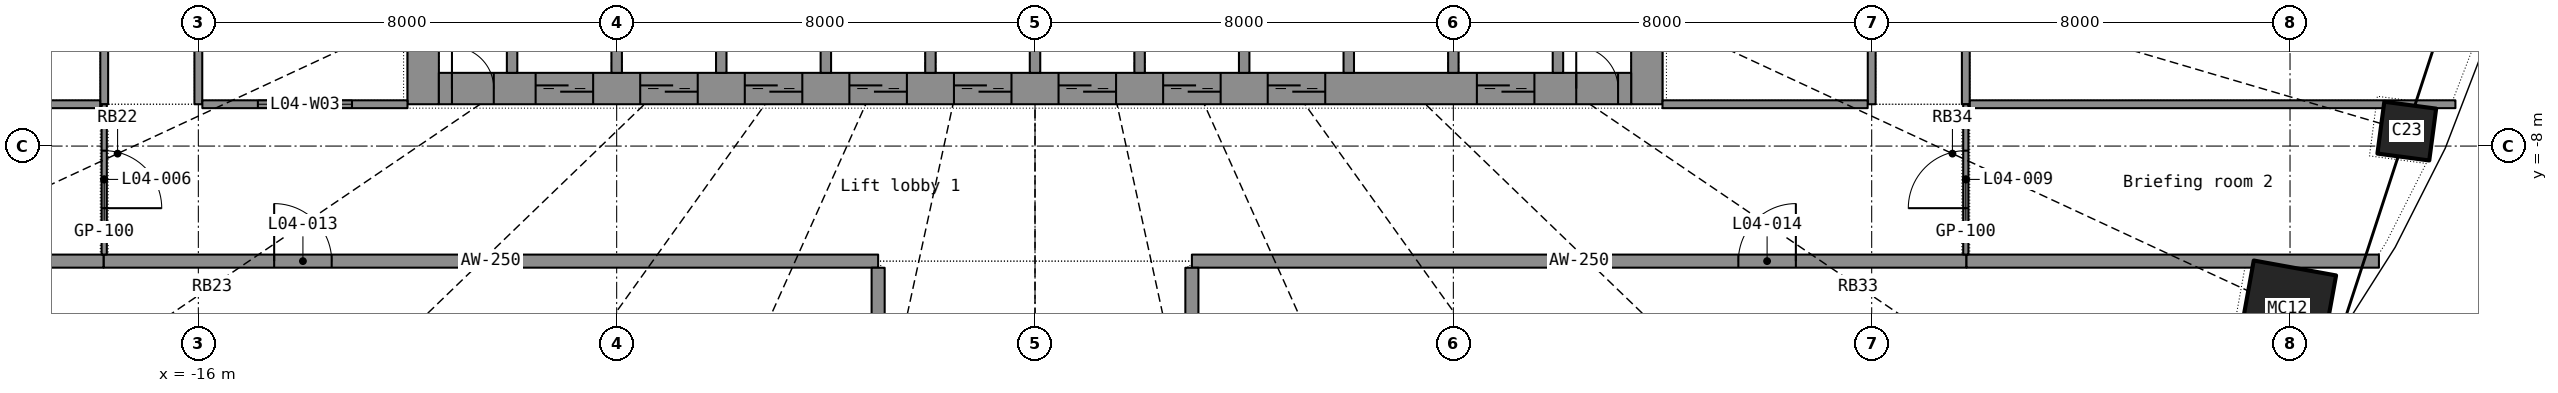
"""IFC4 building model, lengths in metres.
Left out: names, types, materials, properties, quantities, classifications, styles, units other than length and angle.
Written with IfcOpenShell. Run it as: python <this file> out.ifc"""

import sys

from ifc_helpers import new_model, si_unit, direction, frame, frame_2d, origin, origin_2d, place, context, subcontext, project, spatial, rectangle, hollow_rectangle, extrude, element, fill, save


model = new_model("IFC4")
c1 = context("Model", 3, precision=1e-05, world=origin(), true_north=direction((0.0, 1.0)))
c2 = subcontext(c1, "Body", "Model", "MODEL_VIEW")
j1 = project(units=[si_unit("LENGTHUNIT", "METRE"), si_unit("PLANEANGLEUNIT", "RADIAN")], contexts=[c1])
p1 = place(None, origin())
s1 = spatial("IfcSite", under=j1, at=p1, CompositionType="ELEMENT")
p2 = place(p1, origin())
s2 = spatial("IfcBuilding", under=s1, at=p2, CompositionType="ELEMENT")
p3 = place(p2, frame((0.0, 0.0, 24.5)))
s3 = spatial("IfcBuildingStorey", under=s2, at=p3, CompositionType="ELEMENT", Elevation=24.5)
p4 = place(p3, frame((23.951, -11.118, 0.0), z_axis=(-0.029978272, 0.014175772, 0.999450024), x_axis=(-0.581821077, -0.813295293, -0.005916156)))
e1 = element("IfcColumn", 1, at=p4, inside=s3, PredefinedType="COLUMN", context=c2, shape_type="SweptSolid", body=[
    extrude(hollow_rectangle(XDim=1.6, YDim=1.6, WallThickness=0.04, at=origin_2d()), origin(), (0.0, 0.0, 1.0), 4.202),
])
p5 = place(p3, frame((26.233, -7.714, 0.0), z_axis=(-0.032533697, 0.009702013, 0.999423549), x_axis=(-0.40948935, -0.912303929, -0.004473596)))
e2 = element("IfcColumn", 2, at=p5, inside=s3, PredefinedType="COLUMN", context=c2, shape_type="SweptSolid", body=[
    extrude(hollow_rectangle(XDim=1.0, YDim=1.0, WallThickness=0.032, at=origin_2d()), origin(), (0.0, 0.0, 1.0), 4.202),
])
p6 = place(p3, frame((-11.7, -7.2, 0.0), z_axis=(0.0, 0.0, 1.0), x_axis=(0.0, 1.0, 0.0)))
e3 = element("IfcWall", 3, at=p6, inside=s3, PredefinedType="SHEAR", context=c2, shape_type="SweptSolid", body=[
    extrude(rectangle(XDim=14.4, YDim=0.6, at=frame_2d((7.2, 0.0))), origin(), (0.0, 0.0, 1.0), 3.8),
])
p7 = place(p6, frame((6.5, 0.0, 0.0)))
e4 = element("IfcOpeningElement", 4, at=p7, cuts=e3, PredefinedType="OPENING", context=c2, shape_type="SweptSolid", body=[
    extrude(rectangle(XDim=1.4, YDim=2.2, at=frame_2d((0.7, 1.1))), frame((0.0, 0.31, 0.0), z_axis=(0.0, -1.0, 0.0), x_axis=(1.0, 0.0, 0.0)), (0.0, 0.0, 1.0), 0.62),
])
p8 = place(p3, frame((11.7, -7.2, 0.0), z_axis=(0.0, 0.0, 1.0), x_axis=(0.0, 1.0, 0.0)))
e5 = element("IfcWall", 5, at=p8, inside=s3, PredefinedType="SHEAR", context=c2, shape_type="SweptSolid", body=[
    extrude(rectangle(XDim=14.4, YDim=0.6, at=frame_2d((7.2, 0.0))), origin(), (0.0, 0.0, 1.0), 3.8),
])
p9 = place(p8, frame((6.5, 0.0, 0.0)))
e6 = element("IfcOpeningElement", 6, at=p9, cuts=e5, PredefinedType="OPENING", context=c2, shape_type="SweptSolid", body=[
    extrude(rectangle(XDim=1.4, YDim=2.2, at=frame_2d((0.7, 1.1))), frame((0.0, 0.31, 0.0), z_axis=(0.0, -1.0, 0.0), x_axis=(1.0, 0.0, 0.0)), (0.0, 0.0, 1.0), 0.62),
])
p10 = place(p3, frame((-11.4, -6.9, 0.0), z_axis=(0.0, 0.0, 1.0), x_axis=(1.0, 0.0, 0.0)))
e7 = element("IfcWall", 7, at=p10, inside=s3, PredefinedType="SHEAR", context=c2, shape_type="SweptSolid", body=[
    extrude(rectangle(XDim=22.8, YDim=0.6, at=frame_2d((11.4, 0.0))), origin(), (0.0, 0.0, 1.0), 3.8),
])
p11 = place(p10, frame((1.85, 0.0, 0.0)))
e8 = element("IfcOpeningElement", 8, at=p11, cuts=e7, PredefinedType="OPENING", context=c2, shape_type="SweptSolid", body=[
    extrude(rectangle(XDim=1.1, YDim=2.2, at=frame_2d((0.55, 1.1))), frame((0.0, 0.31, 0.0), z_axis=(0.0, -1.0, 0.0), x_axis=(1.0, 0.0, 0.0)), (0.0, 0.0, 1.0), 0.62),
])
p12 = place(p10, frame((3.85, 0.0, 0.0)))
e9 = element("IfcOpeningElement", 9, at=p12, cuts=e7, PredefinedType="OPENING", context=c2, shape_type="SweptSolid", body=[
    extrude(rectangle(XDim=1.1, YDim=2.2, at=frame_2d((0.55, 1.1))), frame((0.0, 0.31, 0.0), z_axis=(0.0, -1.0, 0.0), x_axis=(1.0, 0.0, 0.0)), (0.0, 0.0, 1.0), 0.62),
])
p13 = place(p10, frame((5.85, 0.0, 0.0)))
e10 = element("IfcOpeningElement", 10, at=p13, cuts=e7, PredefinedType="OPENING", context=c2, shape_type="SweptSolid", body=[
    extrude(rectangle(XDim=1.1, YDim=2.2, at=frame_2d((0.55, 1.1))), frame((0.0, 0.31, 0.0), z_axis=(0.0, -1.0, 0.0), x_axis=(1.0, 0.0, 0.0)), (0.0, 0.0, 1.0), 0.62),
])
p14 = place(p10, frame((7.85, 0.0, 0.0)))
e11 = element("IfcOpeningElement", 11, at=p14, cuts=e7, PredefinedType="OPENING", context=c2, shape_type="SweptSolid", body=[
    extrude(rectangle(XDim=1.1, YDim=2.2, at=frame_2d((0.55, 1.1))), frame((0.0, 0.31, 0.0), z_axis=(0.0, -1.0, 0.0), x_axis=(1.0, 0.0, 0.0)), (0.0, 0.0, 1.0), 0.62),
])
p15 = place(p10, frame((9.85, 0.0, 0.0)))
e12 = element("IfcOpeningElement", 12, at=p15, cuts=e7, PredefinedType="OPENING", context=c2, shape_type="SweptSolid", body=[
    extrude(rectangle(XDim=1.1, YDim=2.2, at=frame_2d((0.55, 1.1))), frame((0.0, 0.31, 0.0), z_axis=(0.0, -1.0, 0.0), x_axis=(1.0, 0.0, 0.0)), (0.0, 0.0, 1.0), 0.62),
])
p16 = place(p10, frame((11.85, 0.0, 0.0)))
e13 = element("IfcOpeningElement", 13, at=p16, cuts=e7, PredefinedType="OPENING", context=c2, shape_type="SweptSolid", body=[
    extrude(rectangle(XDim=1.1, YDim=2.2, at=frame_2d((0.55, 1.1))), frame((0.0, 0.31, 0.0), z_axis=(0.0, -1.0, 0.0), x_axis=(1.0, 0.0, 0.0)), (0.0, 0.0, 1.0), 0.62),
])
p17 = place(p10, frame((13.85, 0.0, 0.0)))
e14 = element("IfcOpeningElement", 14, at=p17, cuts=e7, PredefinedType="OPENING", context=c2, shape_type="SweptSolid", body=[
    extrude(rectangle(XDim=1.1, YDim=2.2, at=frame_2d((0.55, 1.1))), frame((0.0, 0.31, 0.0), z_axis=(0.0, -1.0, 0.0), x_axis=(1.0, 0.0, 0.0)), (0.0, 0.0, 1.0), 0.62),
])
p18 = place(p10, frame((15.85, 0.0, 0.0)))
e15 = element("IfcOpeningElement", 15, at=p18, cuts=e7, PredefinedType="OPENING", context=c2, shape_type="SweptSolid", body=[
    extrude(rectangle(XDim=1.1, YDim=2.2, at=frame_2d((0.55, 1.1))), frame((0.0, 0.31, 0.0), z_axis=(0.0, -1.0, 0.0), x_axis=(1.0, 0.0, 0.0)), (0.0, 0.0, 1.0), 0.62),
])
p19 = place(p10, frame((19.85, 0.0, 0.0)))
e16 = element("IfcOpeningElement", 16, at=p19, cuts=e7, PredefinedType="OPENING", context=c2, shape_type="SweptSolid", body=[
    extrude(rectangle(XDim=1.1, YDim=2.2, at=frame_2d((0.55, 1.1))), frame((0.0, 0.31, 0.0), z_axis=(0.0, -1.0, 0.0), x_axis=(1.0, 0.0, 0.0)), (0.0, 0.0, 1.0), 0.62),
])
p20 = place(p10, frame((0.25, 0.0, 0.0)))
e17 = element("IfcOpeningElement", 17, at=p20, cuts=e7, PredefinedType="OPENING", context=c2, shape_type="SweptSolid", body=[
    extrude(rectangle(XDim=0.8, YDim=2.05, at=frame_2d((0.4, 1.025))), frame((0.0, 0.31, 0.0), z_axis=(0.0, -1.0, 0.0), x_axis=(1.0, 0.0, 0.0)), (0.0, 0.0, 1.0), 0.62),
])
p21 = place(p10, frame((21.75, 0.0, 0.0)))
e18 = element("IfcOpeningElement", 18, at=p21, cuts=e7, PredefinedType="OPENING", context=c2, shape_type="SweptSolid", body=[
    extrude(rectangle(XDim=0.8, YDim=2.05, at=frame_2d((0.4, 1.025))), frame((0.0, 0.31, 0.0), z_axis=(0.0, -1.0, 0.0), x_axis=(1.0, 0.0, 0.0)), (0.0, 0.0, 1.0), 0.62),
])
for number, where, z_axis, x_axis in (
    (19, (-10.0, -6.6, 0.0), (0.0, 0.0, 1.0), (0.0, 1.0, 0.0)),
    (20, (-8.0, -6.6, 0.0), (0.0, 0.0, 1.0), (0.0, 1.0, 0.0)),
    (21, (-6.0, -6.6, 0.0), (0.0, 0.0, 1.0), (0.0, 1.0, 0.0)),
    (22, (-4.0, -6.6, 0.0), (0.0, 0.0, 1.0), (0.0, 1.0, 0.0)),
    (23, (-2.0, -6.6, 0.0), (0.0, 0.0, 1.0), (0.0, 1.0, 0.0)),
    (24, (0.0, -6.6, 0.0), (0.0, 0.0, 1.0), (0.0, 1.0, 0.0)),
    (25, (2.0, -6.6, 0.0), (0.0, 0.0, 1.0), (0.0, 1.0, 0.0)),
    (26, (4.0, -6.6, 0.0), (0.0, 0.0, 1.0), (0.0, 1.0, 0.0)),
    (27, (6.0, -6.6, 0.0), (0.0, 0.0, 1.0), (0.0, 1.0, 0.0)),
    (28, (8.0, -6.6, 0.0), (0.0, 0.0, 1.0), (0.0, 1.0, 0.0)),
    (29, (10.0, -6.6, 0.0), (0.0, 0.0, 1.0), (0.0, 1.0, 0.0)),
):
    element("IfcWall", number, at=place(p3, frame(where, z_axis=z_axis, x_axis=x_axis)), inside=s3, PredefinedType="SHEAR", context=c2, shape_type="SweptSolid", body=[
        extrude(rectangle(XDim=2.7, YDim=0.2, at=frame_2d((1.35, 0.0))), origin(), (0.0, 0.0, 1.0), 3.8),
    ])
p22 = place(p3, frame((-17.812, -10.2, 0.0), z_axis=(0.0, 0.0, 1.0), x_axis=(1.0, 0.0, 0.0)))
e30 = element("IfcWall", 30, at=p22, inside=s3, PredefinedType="PARTITIONING", context=c2, shape_type="SweptSolid", body=[
    extrude(rectangle(XDim=14.812, YDim=0.25, at=frame_2d((7.406, 0.0))), origin(), (0.0, 0.0, 1.0), 2.8),
])
p23 = place(p22, frame((3.262, 0.0, 0.0)))
e31 = element("IfcOpeningElement", 31, at=p23, cuts=e30, PredefinedType="OPENING", context=c2, shape_type="SweptSolid", body=[
    extrude(rectangle(XDim=1.1, YDim=2.2, at=frame_2d((0.55, 1.1))), frame((0.0, 0.135, 0.0), z_axis=(0.0, -1.0, 0.0), x_axis=(1.0, 0.0, 0.0)), (0.0, 0.0, 1.0), 0.27),
])
p24 = place(p3, frame((3.0, -10.2, 0.0), z_axis=(0.0, 0.0, 1.0), x_axis=(1.0, 0.0, 0.0)))
e32 = element("IfcWall", 32, at=p24, inside=s3, PredefinedType="PARTITIONING", context=c2, shape_type="SweptSolid", body=[
    extrude(rectangle(XDim=14.812, YDim=0.25, at=frame_2d((7.406, 0.0))), origin(), (0.0, 0.0, 1.0), 2.8),
])
p25 = place(p24, frame((10.45, 0.0, 0.0)))
e33 = element("IfcOpeningElement", 33, at=p25, cuts=e32, PredefinedType="OPENING", context=c2, shape_type="SweptSolid", body=[
    extrude(rectangle(XDim=1.1, YDim=2.2, at=frame_2d((0.55, 1.1))), frame((0.0, 0.135, 0.0), z_axis=(0.0, -1.0, 0.0), x_axis=(1.0, 0.0, 0.0)), (0.0, 0.0, 1.0), 0.27),
])
p26 = place(p3, frame((-17.8, 7.2, 0.0), z_axis=(0.0, 0.0, 1.0), x_axis=(0.0, -1.0, 0.0)))
e34 = element("IfcWall", 34, at=p26, inside=s3, PredefinedType="PARTITIONING", context=c2, shape_type="SweptSolid", body=[
    extrude(rectangle(XDim=14.4, YDim=0.15, at=frame_2d((7.2, 0.0))), origin(), (0.0, 0.0, 1.0), 2.8),
])
p27 = place(p26, frame((6.725, 0.0, 0.0)))
e35 = element("IfcOpeningElement", 35, at=p27, cuts=e34, PredefinedType="OPENING", context=c2, shape_type="SweptSolid", body=[
    extrude(rectangle(XDim=0.95, YDim=2.15, at=frame_2d((0.475, 1.075))), frame((0.0, 0.085, 0.0), z_axis=(0.0, -1.0, 0.0), x_axis=(1.0, 0.0, 0.0)), (0.0, 0.0, 1.0), 0.17),
])
p28 = place(p3, frame((17.8, -7.2, 0.0), z_axis=(0.0, 0.0, 1.0), x_axis=(0.0, 1.0, 0.0)))
e36 = element("IfcWall", 36, at=p28, inside=s3, PredefinedType="PARTITIONING", context=c2, shape_type="SweptSolid", body=[
    extrude(rectangle(XDim=14.4, YDim=0.15, at=frame_2d((7.2, 0.0))), origin(), (0.0, 0.0, 1.0), 2.8),
])
p29 = place(p28, frame((6.725, 0.0, 0.0)))
e37 = element("IfcOpeningElement", 37, at=p29, cuts=e36, PredefinedType="OPENING", context=c2, shape_type="SweptSolid", body=[
    extrude(rectangle(XDim=0.95, YDim=2.15, at=frame_2d((0.475, 1.075))), frame((0.0, 0.085, 0.0), z_axis=(0.0, -1.0, 0.0), x_axis=(1.0, 0.0, 0.0)), (0.0, 0.0, 1.0), 0.17),
])
for number, where, z_axis, x_axis in (
    (38, (-17.877, -7.2, 0.0), (0.0, 0.0, 1.0), (-1.0, 0.0, 0.0)),
    (39, (27.163, -7.2, 0.0), (0.0, 0.0, 1.0), (-1.0, 0.0, 0.0)),
):
    element("IfcWall", number, at=place(p3, frame(where, z_axis=z_axis, x_axis=x_axis)), inside=s3, PredefinedType="PARTITIONING", context=c2, shape_type="SweptSolid", body=[
        extrude(rectangle(XDim=9.286, YDim=0.15, at=frame_2d((4.643, 0.0))), origin(), (0.0, 0.0, 1.0), 2.8),
    ])
for number, where, z_axis, x_axis in (
    (40, (-17.813, -10.2, 0.0), (0.0, 0.0, 1.0), (-1.0, 0.0, 0.0)),
    (41, (25.7, -10.2, 0.0), (0.0, 0.0, 1.0), (-1.0, 0.0, 0.0)),
):
    element("IfcWall", number, at=place(p3, frame(where, z_axis=z_axis, x_axis=x_axis)), inside=s3, PredefinedType="PARTITIONING", context=c2, shape_type="SweptSolid", body=[
        extrude(rectangle(XDim=7.887, YDim=0.25, at=frame_2d((3.944, 0.0))), origin(), (0.0, 0.0, 1.0), 2.8),
    ])
p30 = place(p3, frame((-16.0, -7.2, 0.0), z_axis=(0.0, 0.0, 1.0), x_axis=(0.0, 1.0, 0.0)))
e42 = element("IfcWall", 42, at=p30, inside=s3, PredefinedType="PARTITIONING", context=c2, shape_type="SweptSolid", body=[
    extrude(rectangle(XDim=6.3, YDim=0.15, at=frame_2d((3.15, 0.0))), origin(), (0.0, 0.0, 1.0), 2.8),
])
p31 = place(p30, frame((2.65, 0.0, 0.0)))
e43 = element("IfcOpeningElement", 43, at=p31, cuts=e42, PredefinedType="OPENING", context=c2, shape_type="SweptSolid", body=[
    extrude(rectangle(XDim=1.0, YDim=2.2, at=frame_2d((0.5, 1.1))), frame((0.0, 0.085, 0.0), z_axis=(0.0, -1.0, 0.0), x_axis=(1.0, 0.0, 0.0)), (0.0, 0.0, 1.0), 0.17),
])
p32 = place(p3, frame((16.0, -0.9, 0.0), z_axis=(0.0, 0.0, 1.0), x_axis=(0.0, -1.0, 0.0)))
e44 = element("IfcWall", 44, at=p32, inside=s3, PredefinedType="PARTITIONING", context=c2, shape_type="SweptSolid", body=[
    extrude(rectangle(XDim=6.3, YDim=0.15, at=frame_2d((3.15, 0.0))), origin(), (0.0, 0.0, 1.0), 2.8),
])
p33 = place(p32, frame((2.65, 0.0, 0.0)))
e45 = element("IfcOpeningElement", 45, at=p33, cuts=e44, PredefinedType="OPENING", context=c2, shape_type="SweptSolid", body=[
    extrude(rectangle(XDim=1.0, YDim=2.2, at=frame_2d((0.5, 1.1))), frame((0.0, 0.085, 0.0), z_axis=(0.0, -1.0, 0.0), x_axis=(1.0, 0.0, 0.0)), (0.0, 0.0, 1.0), 0.17),
])
p34 = place(p3, frame((-12.0, -7.2, 0.0), z_axis=(0.0, 0.0, 1.0), x_axis=(-1.0, 0.0, 0.0)))
e46 = element("IfcWall", 46, at=p34, inside=s3, PredefinedType="PARTITIONING", context=c2, shape_type="SweptSolid", body=[
    extrude(rectangle(XDim=3.923, YDim=0.15, at=frame_2d((1.961, 0.0))), origin(), (0.0, 0.0, 1.0), 2.8),
])
p35 = place(p34, frame((1.062, 0.0, 1.0)))
e47 = element("IfcOpeningElement", 47, at=p35, cuts=e46, PredefinedType="OPENING", context=c2, shape_type="SweptSolid", body=[
    extrude(rectangle(XDim=1.8, YDim=1.2, at=frame_2d((0.9, 0.6))), frame((0.0, 0.085, 0.0), z_axis=(0.0, -1.0, 0.0), x_axis=(1.0, 0.0, 0.0)), (0.0, 0.0, 1.0), 0.17),
])
p36 = place(p3, frame((15.923, -7.2, 0.0), z_axis=(0.0, 0.0, 1.0), x_axis=(-1.0, 0.0, 0.0)))
e48 = element("IfcWall", 48, at=p36, inside=s3, PredefinedType="PARTITIONING", context=c2, shape_type="SweptSolid", body=[
    extrude(rectangle(XDim=3.923, YDim=0.15, at=frame_2d((1.961, 0.0))), origin(), (0.0, 0.0, 1.0), 2.8),
])
for number, where, z_axis, x_axis in (
    (49, (-3.0, -10.327, 0.0), (0.0, 0.0, 1.0), (0.0, -1.0, 0.0)),
    (50, (3.0, -13.073, 0.0), (0.0, 0.0, 1.0), (0.0, 1.0, 0.0)),
):
    element("IfcWall", number, at=place(p3, frame(where, z_axis=z_axis, x_axis=x_axis)), inside=s3, PredefinedType="PARTITIONING", context=c2, shape_type="SweptSolid", body=[
        extrude(rectangle(XDim=2.746, YDim=0.25, at=frame_2d((1.373, 0.0))), origin(), (0.0, 0.0, 1.0), 2.8),
    ])
p37 = place(p3, frame((-17.8, -7.201, 0.0), z_axis=(0.0, 0.0, 1.0), x_axis=(0.0, -1.0, 0.0)))
e51 = element("IfcWall", 51, at=p37, inside=s3, PredefinedType="PARTITIONING", context=c2, shape_type="SweptSolid", body=[
    extrude(rectangle(XDim=2.873, YDim=0.1, at=frame_2d((1.437, 0.0))), origin(), (0.0, 0.0, 1.0), 2.8),
])
p38 = place(p37, frame((0.887, 0.0, 0.0)))
e52 = element("IfcOpeningElement", 52, at=p38, cuts=e51, PredefinedType="OPENING", context=c2, shape_type="SweptSolid", body=[
    extrude(rectangle(XDim=1.1, YDim=2.2, at=frame_2d((0.55, 1.1))), frame((0.0, 0.06, 0.0), z_axis=(0.0, -1.0, 0.0), x_axis=(1.0, 0.0, 0.0)), (0.0, 0.0, 1.0), 0.12),
])
p39 = place(p3, frame((17.8, -10.074, 0.0), z_axis=(0.0, 0.0, 1.0), x_axis=(0.0, 1.0, 0.0)))
e53 = element("IfcWall", 53, at=p39, inside=s3, PredefinedType="PARTITIONING", context=c2, shape_type="SweptSolid", body=[
    extrude(rectangle(XDim=2.873, YDim=0.1, at=frame_2d((1.437, 0.0))), origin(), (0.0, 0.0, 1.0), 2.8),
])
p40 = place(p39, frame((0.887, 0.0, 0.0)))
e54 = element("IfcOpeningElement", 54, at=p40, cuts=e53, PredefinedType="OPENING", context=c2, shape_type="SweptSolid", body=[
    extrude(rectangle(XDim=1.1, YDim=2.2, at=frame_2d((0.55, 1.1))), frame((0.0, 0.06, 0.0), z_axis=(0.0, -1.0, 0.0), x_axis=(1.0, 0.0, 0.0)), (0.0, 0.0, 1.0), 0.12),
])
p41 = place(p11, origin())
e55 = element("IfcDoor", 55, at=p41, inside=s3, OperationType="DOUBLE_DOOR_SLIDING", PredefinedType="DOOR", context=c2, shape_type="SweptSolid", body=[
    extrude(rectangle(XDim=1.1, YDim=2.2, at=frame_2d((0.55, 1.1))), frame((0.0, 0.025, 0.0), z_axis=(0.0, -1.0, 0.0), x_axis=(1.0, 0.0, 0.0)), (0.0, 0.0, 1.0), 0.05),
])
fill(e8, e55)
p42 = place(p12, origin())
e56 = element("IfcDoor", 56, at=p42, inside=s3, OperationType="DOUBLE_DOOR_SLIDING", PredefinedType="DOOR", context=c2, shape_type="SweptSolid", body=[
    extrude(rectangle(XDim=1.1, YDim=2.2, at=frame_2d((0.55, 1.1))), frame((0.0, 0.025, 0.0), z_axis=(0.0, -1.0, 0.0), x_axis=(1.0, 0.0, 0.0)), (0.0, 0.0, 1.0), 0.05),
])
fill(e9, e56)
p43 = place(p13, origin())
e57 = element("IfcDoor", 57, at=p43, inside=s3, OperationType="DOUBLE_DOOR_SLIDING", PredefinedType="DOOR", context=c2, shape_type="SweptSolid", body=[
    extrude(rectangle(XDim=1.1, YDim=2.2, at=frame_2d((0.55, 1.1))), frame((0.0, 0.025, 0.0), z_axis=(0.0, -1.0, 0.0), x_axis=(1.0, 0.0, 0.0)), (0.0, 0.0, 1.0), 0.05),
])
fill(e10, e57)
p44 = place(p14, origin())
e58 = element("IfcDoor", 58, at=p44, inside=s3, OperationType="DOUBLE_DOOR_SLIDING", PredefinedType="DOOR", context=c2, shape_type="SweptSolid", body=[
    extrude(rectangle(XDim=1.1, YDim=2.2, at=frame_2d((0.55, 1.1))), frame((0.0, 0.025, 0.0), z_axis=(0.0, -1.0, 0.0), x_axis=(1.0, 0.0, 0.0)), (0.0, 0.0, 1.0), 0.05),
])
fill(e11, e58)
p45 = place(p15, origin())
e59 = element("IfcDoor", 59, at=p45, inside=s3, OperationType="DOUBLE_DOOR_SLIDING", PredefinedType="DOOR", context=c2, shape_type="SweptSolid", body=[
    extrude(rectangle(XDim=1.1, YDim=2.2, at=frame_2d((0.55, 1.1))), frame((0.0, 0.025, 0.0), z_axis=(0.0, -1.0, 0.0), x_axis=(1.0, 0.0, 0.0)), (0.0, 0.0, 1.0), 0.05),
])
fill(e12, e59)
p46 = place(p16, origin())
e60 = element("IfcDoor", 60, at=p46, inside=s3, OperationType="DOUBLE_DOOR_SLIDING", PredefinedType="DOOR", context=c2, shape_type="SweptSolid", body=[
    extrude(rectangle(XDim=1.1, YDim=2.2, at=frame_2d((0.55, 1.1))), frame((0.0, 0.025, 0.0), z_axis=(0.0, -1.0, 0.0), x_axis=(1.0, 0.0, 0.0)), (0.0, 0.0, 1.0), 0.05),
])
fill(e13, e60)
p47 = place(p17, origin())
e61 = element("IfcDoor", 61, at=p47, inside=s3, OperationType="DOUBLE_DOOR_SLIDING", PredefinedType="DOOR", context=c2, shape_type="SweptSolid", body=[
    extrude(rectangle(XDim=1.1, YDim=2.2, at=frame_2d((0.55, 1.1))), frame((0.0, 0.025, 0.0), z_axis=(0.0, -1.0, 0.0), x_axis=(1.0, 0.0, 0.0)), (0.0, 0.0, 1.0), 0.05),
])
fill(e14, e61)
p48 = place(p18, origin())
e62 = element("IfcDoor", 62, at=p48, inside=s3, OperationType="DOUBLE_DOOR_SLIDING", PredefinedType="DOOR", context=c2, shape_type="SweptSolid", body=[
    extrude(rectangle(XDim=1.1, YDim=2.2, at=frame_2d((0.55, 1.1))), frame((0.0, 0.025, 0.0), z_axis=(0.0, -1.0, 0.0), x_axis=(1.0, 0.0, 0.0)), (0.0, 0.0, 1.0), 0.05),
])
fill(e15, e62)
p49 = place(p19, origin())
e63 = element("IfcDoor", 63, at=p49, inside=s3, OperationType="DOUBLE_DOOR_SLIDING", PredefinedType="DOOR", context=c2, shape_type="SweptSolid", body=[
    extrude(rectangle(XDim=1.1, YDim=2.2, at=frame_2d((0.55, 1.1))), frame((0.0, 0.025, 0.0), z_axis=(0.0, -1.0, 0.0), x_axis=(1.0, 0.0, 0.0)), (0.0, 0.0, 1.0), 0.05),
])
fill(e16, e63)
p50 = place(p20, origin())
e64 = element("IfcDoor", 64, at=p50, inside=s3, OperationType="SINGLE_SWING_LEFT", PredefinedType="DOOR", context=c2, shape_type="SweptSolid", body=[
    extrude(rectangle(XDim=0.8, YDim=2.05, at=frame_2d((0.4, 1.025))), frame((0.0, 0.025, 0.0), z_axis=(0.0, -1.0, 0.0), x_axis=(1.0, 0.0, 0.0)), (0.0, 0.0, 1.0), 0.05),
])
fill(e17, e64)
p51 = place(p21, origin())
e65 = element("IfcDoor", 65, at=p51, inside=s3, OperationType="SINGLE_SWING_LEFT", PredefinedType="DOOR", context=c2, shape_type="SweptSolid", body=[
    extrude(rectangle(XDim=0.8, YDim=2.05, at=frame_2d((0.4, 1.025))), frame((0.0, 0.025, 0.0), z_axis=(0.0, -1.0, 0.0), x_axis=(1.0, 0.0, 0.0)), (0.0, 0.0, 1.0), 0.05),
])
fill(e18, e65)
p52 = place(p38, origin())
e66 = element("IfcDoor", 66, at=p52, inside=s3, OperationType="SINGLE_SWING_RIGHT", PredefinedType="DOOR", context=c2, shape_type="SweptSolid", body=[
    extrude(rectangle(XDim=1.1, YDim=2.2, at=frame_2d((0.55, 1.1))), frame((0.0, 0.025, 0.0), z_axis=(0.0, -1.0, 0.0), x_axis=(1.0, 0.0, 0.0)), (0.0, 0.0, 1.0), 0.05),
])
fill(e52, e66)
p53 = place(p40, origin())
e67 = element("IfcDoor", 67, at=p53, inside=s3, OperationType="SINGLE_SWING_LEFT", PredefinedType="DOOR", context=c2, shape_type="SweptSolid", body=[
    extrude(rectangle(XDim=1.1, YDim=2.2, at=frame_2d((0.55, 1.1))), frame((0.0, 0.025, 0.0), z_axis=(0.0, -1.0, 0.0), x_axis=(1.0, 0.0, 0.0)), (0.0, 0.0, 1.0), 0.05),
])
fill(e54, e67)
p54 = place(p23, origin())
e68 = element("IfcDoor", 68, at=p54, inside=s3, OperationType="SINGLE_SWING_LEFT", PredefinedType="DOOR", context=c2, shape_type="SweptSolid", body=[
    extrude(rectangle(XDim=1.1, YDim=2.2, at=frame_2d((0.55, 1.1))), frame((0.0, 0.025, 0.0), z_axis=(0.0, -1.0, 0.0), x_axis=(1.0, 0.0, 0.0)), (0.0, 0.0, 1.0), 0.05),
])
fill(e31, e68)
p55 = place(p25, origin())
e69 = element("IfcDoor", 69, at=p55, inside=s3, OperationType="SINGLE_SWING_RIGHT", PredefinedType="DOOR", context=c2, shape_type="SweptSolid", body=[
    extrude(rectangle(XDim=1.1, YDim=2.2, at=frame_2d((0.55, 1.1))), frame((0.0, 0.025, 0.0), z_axis=(0.0, -1.0, 0.0), x_axis=(1.0, 0.0, 0.0)), (0.0, 0.0, 1.0), 0.05),
])
fill(e33, e69)
p56 = place(p35, origin())
e70 = element("IfcWindow", 70, at=p56, inside=s3, PartitioningType="SINGLE_PANEL", PredefinedType="WINDOW", context=c2, shape_type="SweptSolid", body=[
    extrude(rectangle(XDim=1.8, YDim=1.2, at=frame_2d((0.9, 0.6))), frame((0.0, 0.03, 0.0), z_axis=(0.0, -1.0, 0.0), x_axis=(1.0, 0.0, 0.0)), (0.0, 0.0, 1.0), 0.06),
])
fill(e47, e70)
save(model, sys.argv[1])
